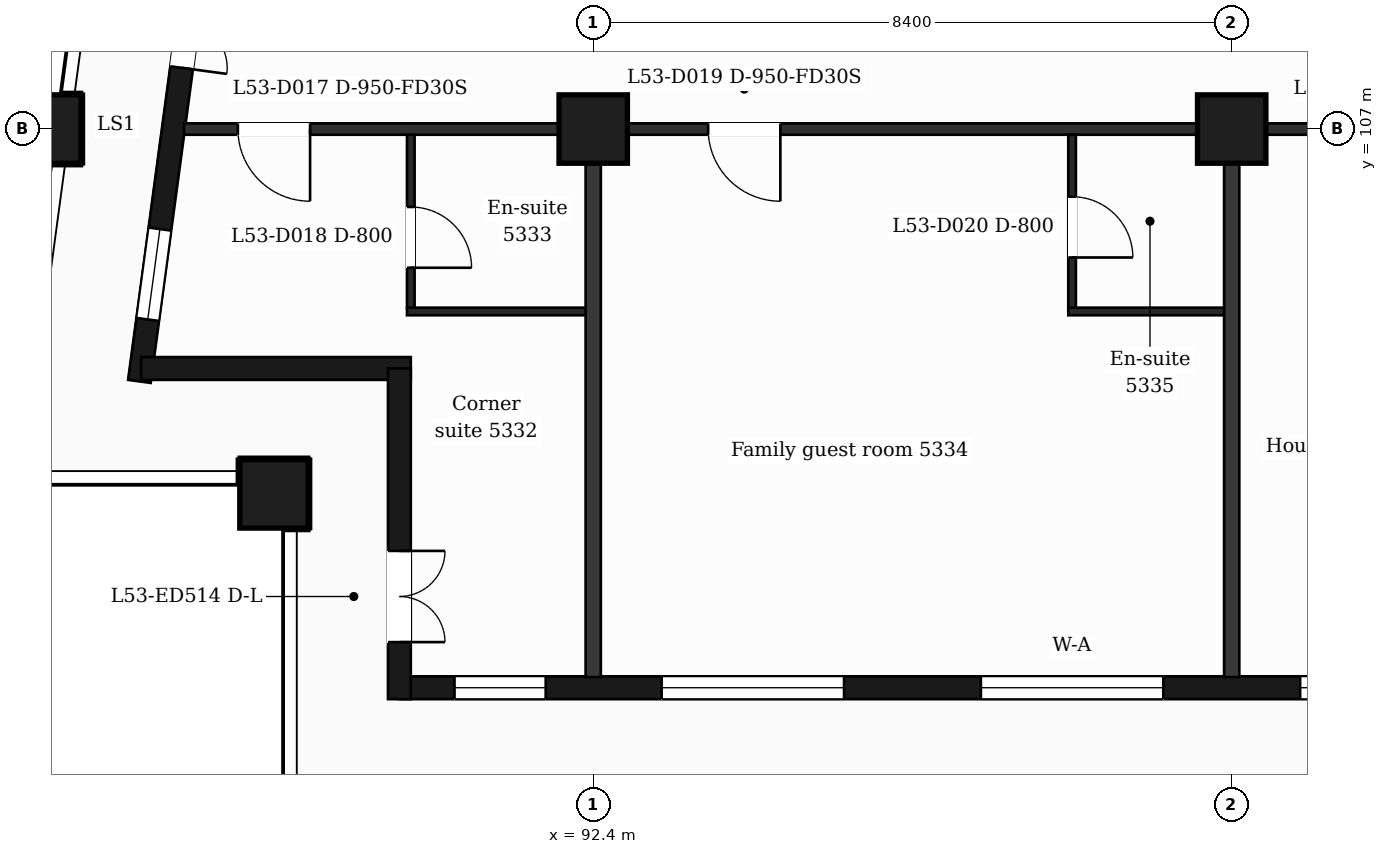
"""IFC4 building model, lengths in metres.
Left out: names, types, materials, properties, quantities, classifications, styles, units other than length and angle.
Written with IfcOpenShell. Run it as: python <this file> out.ifc"""

import sys

from ifc_helpers import new_model, si_unit, direction, frame, frame_2d, origin, origin_2d, place, context, subcontext, project, spatial, rectangle, extrude, element, fill, save


model = new_model("IFC4")
c1 = context("Model", 3, precision=1e-05, world=origin(), true_north=direction((0.0, 1.0)))
c2 = subcontext(c1, "Body", "Model", "MODEL_VIEW")
j1 = project(units=[si_unit("LENGTHUNIT", "METRE"), si_unit("PLANEANGLEUNIT", "RADIAN")], contexts=[c1])
p1 = place(None, origin())
s1 = spatial("IfcSite", under=j1, at=p1, CompositionType="ELEMENT")
p2 = place(p1, origin())
s2 = spatial("IfcBuilding", under=s1, at=p2, CompositionType="ELEMENT")
p3 = place(p2, frame((0.0, 0.0, 220.7)))
s3 = spatial("IfcBuildingStorey", under=s2, at=p3, CompositionType="ELEMENT", Elevation=220.7)
for number, where, z_axis, x_axis in (
    (1, (88.2, 102.2, 0.0), (0.0, 0.0, 1.0), (1.0, 0.0, 0.0)),
    (2, (92.4, 107.0, 0.0), (0.0, 0.0, 1.0), (1.0, 0.0, 0.0)),
    (3, (100.8, 107.0, 0.0), (0.0, 0.0, 1.0), (1.0, 0.0, 0.0)),
    (4, (85.211, 107.0, 0.0), (0.0, 0.0, 1.0), (1.0, 0.0, 0.0)),
):
    element("IfcColumn", number, at=place(p3, frame(where, z_axis=z_axis, x_axis=x_axis)), inside=s3, PredefinedType="COLUMN", context=c2, shape_type="SweptSolid", body=[
        extrude(rectangle(XDim=0.9, YDim=0.9, at=origin_2d()), origin(), (0.0, 0.0, 1.0), 3.7),
    ])
p4 = place(p3, frame((89.85, 99.65, 0.0), z_axis=(0.0, 0.0, 1.0), x_axis=(1.0, 0.0, 0.0)))
e5 = element("IfcWall", 5, at=p4, inside=s3, PredefinedType="SOLIDWALL", context=c2, shape_type="SweptSolid", body=[
    extrude(rectangle(XDim=47.25, YDim=0.3, at=frame_2d((23.625, 0.0))), origin(), (0.0, 0.0, 1.0), 3.38),
])
p5 = place(p4, frame((0.725, 0.0, 0.9)))
e6 = element("IfcOpeningElement", 6, at=p5, cuts=e5, PredefinedType="OPENING", context=c2, shape_type="SweptSolid", body=[
    extrude(rectangle(XDim=1.2, YDim=2.1, at=frame_2d((0.6, 1.05))), frame((0.0, 0.16, 0.0), z_axis=(0.0, -1.0, 0.0), x_axis=(1.0, 0.0, 0.0)), (0.0, 0.0, 1.0), 0.32),
])
p6 = place(p4, frame((3.45, 0.0, 0.9)))
e7 = element("IfcOpeningElement", 7, at=p6, cuts=e5, PredefinedType="OPENING", context=c2, shape_type="SweptSolid", body=[
    extrude(rectangle(XDim=2.4, YDim=2.1, at=frame_2d((1.2, 1.05))), frame((0.0, 0.16, 0.0), z_axis=(0.0, -1.0, 0.0), x_axis=(1.0, 0.0, 0.0)), (0.0, 0.0, 1.0), 0.32),
])
p7 = place(p4, frame((7.65, 0.0, 0.9)))
e8 = element("IfcOpeningElement", 8, at=p7, cuts=e5, PredefinedType="OPENING", context=c2, shape_type="SweptSolid", body=[
    extrude(rectangle(XDim=2.4, YDim=2.1, at=frame_2d((1.2, 1.05))), frame((0.0, 0.16, 0.0), z_axis=(0.0, -1.0, 0.0), x_axis=(1.0, 0.0, 0.0)), (0.0, 0.0, 1.0), 0.32),
])
p8 = place(p4, frame((11.85, 0.0, 0.9)))
e9 = element("IfcOpeningElement", 9, at=p8, cuts=e5, PredefinedType="OPENING", context=c2, shape_type="SweptSolid", body=[
    extrude(rectangle(XDim=2.4, YDim=2.1, at=frame_2d((1.2, 1.05))), frame((0.0, 0.16, 0.0), z_axis=(0.0, -1.0, 0.0), x_axis=(1.0, 0.0, 0.0)), (0.0, 0.0, 1.0), 0.32),
])
p9 = place(p4, frame((16.05, 0.0, 0.9)))
e10 = element("IfcOpeningElement", 10, at=p9, cuts=e5, PredefinedType="OPENING", context=c2, shape_type="SweptSolid", body=[
    extrude(rectangle(XDim=2.4, YDim=2.1, at=frame_2d((1.2, 1.05))), frame((0.0, 0.16, 0.0), z_axis=(0.0, -1.0, 0.0), x_axis=(1.0, 0.0, 0.0)), (0.0, 0.0, 1.0), 0.32),
])
p10 = place(p4, frame((20.25, 0.0, 0.9)))
e11 = element("IfcOpeningElement", 11, at=p10, cuts=e5, PredefinedType="OPENING", context=c2, shape_type="SweptSolid", body=[
    extrude(rectangle(XDim=2.4, YDim=2.1, at=frame_2d((1.2, 1.05))), frame((0.0, 0.16, 0.0), z_axis=(0.0, -1.0, 0.0), x_axis=(1.0, 0.0, 0.0)), (0.0, 0.0, 1.0), 0.32),
])
p11 = place(p4, frame((25.05, 0.0, 0.9)))
e12 = element("IfcOpeningElement", 12, at=p11, cuts=e5, PredefinedType="OPENING", context=c2, shape_type="SweptSolid", body=[
    extrude(rectangle(XDim=1.2, YDim=2.1, at=frame_2d((0.6, 1.05))), frame((0.0, 0.16, 0.0), z_axis=(0.0, -1.0, 0.0), x_axis=(1.0, 0.0, 0.0)), (0.0, 0.0, 1.0), 0.32),
])
p12 = place(p4, frame((29.25, 0.0, 0.9)))
e13 = element("IfcOpeningElement", 13, at=p12, cuts=e5, PredefinedType="OPENING", context=c2, shape_type="SweptSolid", body=[
    extrude(rectangle(XDim=1.2, YDim=2.1, at=frame_2d((0.6, 1.05))), frame((0.0, 0.16, 0.0), z_axis=(0.0, -1.0, 0.0), x_axis=(1.0, 0.0, 0.0)), (0.0, 0.0, 1.0), 0.32),
])
p13 = place(p4, frame((32.55, 0.0, 0.0)))
e14 = element("IfcOpeningElement", 14, at=p13, cuts=e5, PredefinedType="OPENING", context=c2, shape_type="SweptSolid", body=[
    extrude(rectangle(XDim=1.2, YDim=2.4, at=frame_2d((0.6, 1.2))), frame((0.0, 0.16, 0.0), z_axis=(0.0, -1.0, 0.0), x_axis=(1.0, 0.0, 0.0)), (0.0, 0.0, 1.0), 0.32),
])
p14 = place(p4, frame((34.35, 0.0, 0.9)))
e15 = element("IfcOpeningElement", 15, at=p14, cuts=e5, PredefinedType="OPENING", context=c2, shape_type="SweptSolid", body=[
    extrude(rectangle(XDim=1.2, YDim=2.1, at=frame_2d((0.6, 1.05))), frame((0.0, 0.16, 0.0), z_axis=(0.0, -1.0, 0.0), x_axis=(1.0, 0.0, 0.0)), (0.0, 0.0, 1.0), 0.32),
])
p15 = place(p4, frame((37.05, 0.0, 0.9)))
e16 = element("IfcOpeningElement", 16, at=p15, cuts=e5, PredefinedType="OPENING", context=c2, shape_type="SweptSolid", body=[
    extrude(rectangle(XDim=2.4, YDim=2.1, at=frame_2d((1.2, 1.05))), frame((0.0, 0.16, 0.0), z_axis=(0.0, -1.0, 0.0), x_axis=(1.0, 0.0, 0.0)), (0.0, 0.0, 1.0), 0.32),
])
p16 = place(p4, frame((40.95, 0.0, 0.0)))
e17 = element("IfcOpeningElement", 17, at=p16, cuts=e5, PredefinedType="OPENING", context=c2, shape_type="SweptSolid", body=[
    extrude(rectangle(XDim=1.2, YDim=2.4, at=frame_2d((0.6, 1.2))), frame((0.0, 0.16, 0.0), z_axis=(0.0, -1.0, 0.0), x_axis=(1.0, 0.0, 0.0)), (0.0, 0.0, 1.0), 0.32),
])
p17 = place(p4, frame((42.75, 0.0, 0.9)))
e18 = element("IfcOpeningElement", 18, at=p17, cuts=e5, PredefinedType="OPENING", context=c2, shape_type="SweptSolid", body=[
    extrude(rectangle(XDim=1.2, YDim=2.1, at=frame_2d((0.6, 1.05))), frame((0.0, 0.16, 0.0), z_axis=(0.0, -1.0, 0.0), x_axis=(1.0, 0.0, 0.0)), (0.0, 0.0, 1.0), 0.32),
])
p18 = place(p4, frame((45.25, 0.0, 0.9)))
e19 = element("IfcOpeningElement", 19, at=p18, cuts=e5, PredefinedType="OPENING", context=c2, shape_type="SweptSolid", body=[
    extrude(rectangle(XDim=1.2, YDim=2.1, at=frame_2d((0.6, 1.05))), frame((0.0, 0.16, 0.0), z_axis=(0.0, -1.0, 0.0), x_axis=(1.0, 0.0, 0.0)), (0.0, 0.0, 1.0), 0.32),
])
p19 = place(p3, frame((87.334, 110.4, 0.0), z_axis=(0.0, 0.0, 1.0), x_axis=(-0.133437175554, -0.991057273915, 0.0)))
e20 = element("IfcWall", 20, at=p19, inside=s3, PredefinedType="SOLIDWALL", context=c2, shape_type="SweptSolid", body=[
    extrude(rectangle(XDim=6.781, YDim=0.3, at=frame_2d((3.39, 0.0))), origin(), (0.0, 0.0, 1.0), 3.38),
])
p20 = place(p19, frame((1.418, 0.0, 0.0)))
e21 = element("IfcOpeningElement", 21, at=p20, cuts=e20, PredefinedType="OPENING", context=c2, shape_type="SweptSolid", body=[
    extrude(rectangle(XDim=1.2, YDim=2.4, at=frame_2d((0.6, 1.2))), frame((0.0, 0.16, 0.0), z_axis=(0.0, -1.0, 0.0), x_axis=(1.0, 0.0, 0.0)), (0.0, 0.0, 1.0), 0.32),
])
p21 = place(p19, frame((4.758, 0.0, 0.9)))
e22 = element("IfcOpeningElement", 22, at=p21, cuts=e20, PredefinedType="OPENING", context=c2, shape_type="SweptSolid", body=[
    extrude(rectangle(XDim=1.2, YDim=2.1, at=frame_2d((0.6, 1.05))), frame((0.0, 0.16, 0.0), z_axis=(0.0, -1.0, 0.0), x_axis=(1.0, 0.0, 0.0)), (0.0, 0.0, 1.0), 0.32),
])
p22 = place(p3, frame((86.452, 103.85, 0.0), z_axis=(0.0, 0.0, 1.0), x_axis=(1.0, 0.0, 0.0)))
e23 = element("IfcWall", 23, at=p22, inside=s3, PredefinedType="SOLIDWALL", context=c2, shape_type="SweptSolid", body=[
    extrude(rectangle(XDim=3.548, YDim=0.3, at=frame_2d((1.774, 0.0))), origin(), (0.0, 0.0, 1.0), 3.38),
])
p23 = place(p3, frame((89.85, 103.85, 0.0), z_axis=(0.0, 0.0, 1.0), x_axis=(0.0, -1.0, 0.0)))
e24 = element("IfcWall", 24, at=p23, inside=s3, PredefinedType="SOLIDWALL", context=c2, shape_type="SweptSolid", body=[
    extrude(rectangle(XDim=4.35, YDim=0.3, at=frame_2d((2.175, 0.0))), origin(), (0.0, 0.0, 1.0), 3.38),
])
p24 = place(p23, frame((2.4, 0.0, 0.0)))
e25 = element("IfcOpeningElement", 25, at=p24, cuts=e24, PredefinedType="OPENING", context=c2, shape_type="SweptSolid", body=[
    extrude(rectangle(XDim=1.2, YDim=2.4, at=frame_2d((0.6, 1.2))), frame((0.0, 0.16, 0.0), z_axis=(0.0, -1.0, 0.0), x_axis=(1.0, 0.0, 0.0)), (0.0, 0.0, 1.0), 0.32),
])
p25 = place(p3, frame((89.95, 104.6, 0.0), z_axis=(0.0, 0.0, 1.0), x_axis=(1.0, 0.0, 0.0)))
e26 = element("IfcWall", 26, at=p25, inside=s3, PredefinedType="PARTITIONING", context=c2, shape_type="SweptSolid", body=[
    extrude(rectangle(XDim=2.45, YDim=0.1, at=frame_2d((1.225, 0.0))), origin(), (0.0, 0.0, 1.0), 3.38),
])
p26 = place(p3, frame((98.65, 104.6, 0.0), z_axis=(0.0, 0.0, 1.0), x_axis=(1.0, 0.0, 0.0)))
e27 = element("IfcWall", 27, at=p26, inside=s3, PredefinedType="PARTITIONING", context=c2, shape_type="SweptSolid", body=[
    extrude(rectangle(XDim=2.15, YDim=0.1, at=frame_2d((1.075, 0.0))), origin(), (0.0, 0.0, 1.0), 3.38),
])
p27 = place(p3, frame((87.018, 107.0, 0.0), z_axis=(0.0, 0.0, 1.0), x_axis=(1.0, 0.0, 0.0)))
e28 = element("IfcWall", 28, at=p27, inside=s3, PredefinedType="PARTITIONING", context=c2, shape_type="SweptSolid", body=[
    extrude(rectangle(XDim=52.765, YDim=0.15, at=frame_2d((26.382, 0.0))), origin(), (0.0, 0.0, 1.0), 3.38),
])
p28 = place(p27, frame((0.707, 0.0, 0.0)))
e29 = element("IfcOpeningElement", 29, at=p28, cuts=e28, PredefinedType="OPENING", context=c2, shape_type="SweptSolid", body=[
    extrude(rectangle(XDim=0.95, YDim=2.1, at=frame_2d((0.475, 1.05))), frame((0.0, 0.085, 0.0), z_axis=(0.0, -1.0, 0.0), x_axis=(1.0, 0.0, 0.0)), (0.0, 0.0, 1.0), 0.17),
])
p29 = place(p27, frame((6.894, 0.0, 0.0)))
e30 = element("IfcOpeningElement", 30, at=p29, cuts=e28, PredefinedType="OPENING", context=c2, shape_type="SweptSolid", body=[
    extrude(rectangle(XDim=0.95, YDim=2.1, at=frame_2d((0.475, 1.05))), frame((0.0, 0.085, 0.0), z_axis=(0.0, -1.0, 0.0), x_axis=(1.0, 0.0, 0.0)), (0.0, 0.0, 1.0), 0.17),
])
p30 = place(p27, frame((15.662, 0.0, 0.0)))
e31 = element("IfcOpeningElement", 31, at=p30, cuts=e28, PredefinedType="OPENING", context=c2, shape_type="SweptSolid", body=[
    extrude(rectangle(XDim=0.95, YDim=2.1, at=frame_2d((0.475, 1.05))), frame((0.0, 0.085, 0.0), z_axis=(0.0, -1.0, 0.0), x_axis=(1.0, 0.0, 0.0)), (0.0, 0.0, 1.0), 0.17),
])
p31 = place(p27, frame((18.257, 0.0, 0.0)))
e32 = element("IfcOpeningElement", 32, at=p31, cuts=e28, PredefinedType="OPENING", context=c2, shape_type="SweptSolid", body=[
    extrude(rectangle(XDim=0.95, YDim=2.1, at=frame_2d((0.475, 1.05))), frame((0.0, 0.085, 0.0), z_axis=(0.0, -1.0, 0.0), x_axis=(1.0, 0.0, 0.0)), (0.0, 0.0, 1.0), 0.17),
])
p32 = place(p27, frame((28.607, 0.0, 0.0)))
e33 = element("IfcOpeningElement", 33, at=p32, cuts=e28, PredefinedType="OPENING", context=c2, shape_type="SweptSolid", body=[
    extrude(rectangle(XDim=1.0, YDim=2.1, at=frame_2d((0.5, 1.05))), frame((0.0, 0.085, 0.0), z_axis=(0.0, -1.0, 0.0), x_axis=(1.0, 0.0, 0.0)), (0.0, 0.0, 1.0), 0.17),
])
p33 = place(p27, frame((31.302, 0.0, 0.0)))
e34 = element("IfcOpeningElement", 34, at=p33, cuts=e28, PredefinedType="OPENING", context=c2, shape_type="SweptSolid", body=[
    extrude(rectangle(XDim=0.95, YDim=2.1, at=frame_2d((0.475, 1.05))), frame((0.0, 0.085, 0.0), z_axis=(0.0, -1.0, 0.0), x_axis=(1.0, 0.0, 0.0)), (0.0, 0.0, 1.0), 0.17),
])
p34 = place(p27, frame((35.057, 0.0, 0.0)))
e35 = element("IfcOpeningElement", 35, at=p34, cuts=e28, PredefinedType="OPENING", context=c2, shape_type="SweptSolid", body=[
    extrude(rectangle(XDim=0.95, YDim=2.1, at=frame_2d((0.475, 1.05))), frame((0.0, 0.085, 0.0), z_axis=(0.0, -1.0, 0.0), x_axis=(1.0, 0.0, 0.0)), (0.0, 0.0, 1.0), 0.17),
])
p35 = place(p27, frame((41.957, 0.0, 0.0)))
e36 = element("IfcOpeningElement", 36, at=p35, cuts=e28, PredefinedType="OPENING", context=c2, shape_type="SweptSolid", body=[
    extrude(rectangle(XDim=0.95, YDim=2.1, at=frame_2d((0.475, 1.05))), frame((0.0, 0.085, 0.0), z_axis=(0.0, -1.0, 0.0), x_axis=(1.0, 0.0, 0.0)), (0.0, 0.0, 1.0), 0.17),
])
p36 = place(p27, frame((45.712, 0.0, 0.0)))
e37 = element("IfcOpeningElement", 37, at=p36, cuts=e28, PredefinedType="OPENING", context=c2, shape_type="SweptSolid", body=[
    extrude(rectangle(XDim=1.0, YDim=2.1, at=frame_2d((0.5, 1.05))), frame((0.0, 0.085, 0.0), z_axis=(0.0, -1.0, 0.0), x_axis=(1.0, 0.0, 0.0)), (0.0, 0.0, 1.0), 0.17),
])
p37 = place(p27, frame((48.974, 0.0, 0.0)))
e38 = element("IfcOpeningElement", 38, at=p37, cuts=e28, PredefinedType="OPENING", context=c2, shape_type="SweptSolid", body=[
    extrude(rectangle(XDim=0.95, YDim=2.1, at=frame_2d((0.475, 1.05))), frame((0.0, 0.085, 0.0), z_axis=(0.0, -1.0, 0.0), x_axis=(1.0, 0.0, 0.0)), (0.0, 0.0, 1.0), 0.17),
])
p38 = place(p3, frame((90.0, 104.65, 0.0), z_axis=(0.0, 0.0, 1.0), x_axis=(0.0, 1.0, 0.0)))
e39 = element("IfcWall", 39, at=p38, inside=s3, PredefinedType="PARTITIONING", context=c2, shape_type="SweptSolid", body=[
    extrude(rectangle(XDim=2.275, YDim=0.1, at=frame_2d((1.138, 0.0))), origin(), (0.0, 0.0, 1.0), 3.38),
])
p39 = place(p38, frame((0.525, 0.0, 0.0)))
e40 = element("IfcOpeningElement", 40, at=p39, cuts=e39, PredefinedType="OPENING", context=c2, shape_type="SweptSolid", body=[
    extrude(rectangle(XDim=0.8, YDim=2.1, at=frame_2d((0.4, 1.05))), frame((0.0, 0.06, 0.0), z_axis=(0.0, -1.0, 0.0), x_axis=(1.0, 0.0, 0.0)), (0.0, 0.0, 1.0), 0.12),
])
p40 = place(p3, frame((92.4, 99.79, 0.0), z_axis=(0.0, 0.0, 1.0), x_axis=(0.0, 1.0, 0.0)))
e41 = element("IfcWall", 41, at=p40, inside=s3, PredefinedType="PARTITIONING", context=c2, shape_type="SweptSolid", body=[
    extrude(rectangle(XDim=7.135, YDim=0.2, at=frame_2d((3.567, 0.0))), origin(), (0.0, 0.0, 1.0), 3.38),
])
p41 = place(p3, frame((98.7, 104.65, 0.0), z_axis=(0.0, 0.0, 1.0), x_axis=(0.0, 1.0, 0.0)))
e42 = element("IfcWall", 42, at=p41, inside=s3, PredefinedType="PARTITIONING", context=c2, shape_type="SweptSolid", body=[
    extrude(rectangle(XDim=2.275, YDim=0.1, at=frame_2d((1.138, 0.0))), origin(), (0.0, 0.0, 1.0), 3.38),
])
p42 = place(p41, frame((0.66, 0.0, 0.0)))
e43 = element("IfcOpeningElement", 43, at=p42, cuts=e42, PredefinedType="OPENING", context=c2, shape_type="SweptSolid", body=[
    extrude(rectangle(XDim=0.8, YDim=2.1, at=frame_2d((0.4, 1.05))), frame((0.0, 0.06, 0.0), z_axis=(0.0, -1.0, 0.0), x_axis=(1.0, 0.0, 0.0)), (0.0, 0.0, 1.0), 0.12),
])
p43 = place(p3, frame((100.8, 99.79, 0.0), z_axis=(0.0, 0.0, 1.0), x_axis=(0.0, 1.0, 0.0)))
e44 = element("IfcWall", 44, at=p43, inside=s3, PredefinedType="PARTITIONING", context=c2, shape_type="SweptSolid", body=[
    extrude(rectangle(XDim=7.135, YDim=0.2, at=frame_2d((3.567, 0.0))), origin(), (0.0, 0.0, 1.0), 3.38),
])
p44 = place(p5, origin())
e45 = element("IfcWindow", 45, at=p44, inside=s3, PartitioningType="SINGLE_PANEL", PredefinedType="WINDOW", context=c2, shape_type="SweptSolid", body=[
    extrude(rectangle(XDim=1.2, YDim=2.1, at=frame_2d((0.6, 1.05))), frame((0.0, 0.03, 0.0), z_axis=(0.0, -1.0, 0.0), x_axis=(1.0, 0.0, 0.0)), (0.0, 0.0, 1.0), 0.06),
])
fill(e6, e45)
p45 = place(p6, origin())
e46 = element("IfcWindow", 46, at=p45, inside=s3, PartitioningType="SINGLE_PANEL", PredefinedType="WINDOW", context=c2, shape_type="SweptSolid", body=[
    extrude(rectangle(XDim=2.4, YDim=2.1, at=frame_2d((1.2, 1.05))), frame((0.0, 0.03, 0.0), z_axis=(0.0, -1.0, 0.0), x_axis=(1.0, 0.0, 0.0)), (0.0, 0.0, 1.0), 0.06),
])
fill(e7, e46)
p46 = place(p7, origin())
e47 = element("IfcWindow", 47, at=p46, inside=s3, PartitioningType="SINGLE_PANEL", PredefinedType="WINDOW", context=c2, shape_type="SweptSolid", body=[
    extrude(rectangle(XDim=2.4, YDim=2.1, at=frame_2d((1.2, 1.05))), frame((0.0, 0.03, 0.0), z_axis=(0.0, -1.0, 0.0), x_axis=(1.0, 0.0, 0.0)), (0.0, 0.0, 1.0), 0.06),
])
fill(e8, e47)
p47 = place(p8, origin())
e48 = element("IfcWindow", 48, at=p47, inside=s3, PartitioningType="SINGLE_PANEL", PredefinedType="WINDOW", context=c2, shape_type="SweptSolid", body=[
    extrude(rectangle(XDim=2.4, YDim=2.1, at=frame_2d((1.2, 1.05))), frame((0.0, 0.03, 0.0), z_axis=(0.0, -1.0, 0.0), x_axis=(1.0, 0.0, 0.0)), (0.0, 0.0, 1.0), 0.06),
])
fill(e9, e48)
p48 = place(p20, origin())
e49 = element("IfcDoor", 49, at=p48, inside=s3, OperationType="DOUBLE_DOOR_SINGLE_SWING", PredefinedType="DOOR", context=c2, shape_type="SweptSolid", body=[
    extrude(rectangle(XDim=1.2, YDim=2.4, at=frame_2d((0.6, 1.2))), frame((0.0, 0.025, 0.0), z_axis=(0.0, -1.0, 0.0), x_axis=(1.0, 0.0, 0.0)), (0.0, 0.0, 1.0), 0.05),
])
fill(e21, e49)
p49 = place(p21, origin())
e50 = element("IfcWindow", 50, at=p49, inside=s3, PartitioningType="SINGLE_PANEL", PredefinedType="WINDOW", context=c2, shape_type="SweptSolid", body=[
    extrude(rectangle(XDim=1.2, YDim=2.1, at=frame_2d((0.6, 1.05))), frame((0.0, 0.03, 0.0), z_axis=(0.0, -1.0, 0.0), x_axis=(1.0, 0.0, 0.0)), (0.0, 0.0, 1.0), 0.06),
])
fill(e22, e50)
p50 = place(p24, origin())
e51 = element("IfcDoor", 51, at=p50, inside=s3, OperationType="DOUBLE_DOOR_SINGLE_SWING", PredefinedType="DOOR", context=c2, shape_type="SweptSolid", body=[
    extrude(rectangle(XDim=1.2, YDim=2.4, at=frame_2d((0.6, 1.2))), frame((0.0, 0.025, 0.0), z_axis=(0.0, -1.0, 0.0), x_axis=(1.0, 0.0, 0.0)), (0.0, 0.0, 1.0), 0.05),
])
fill(e25, e51)
p51 = place(p28, origin())
e52 = element("IfcDoor", 52, at=p51, inside=s3, OperationType="SINGLE_SWING_RIGHT", PredefinedType="DOOR", context=c2, shape_type="SweptSolid", body=[
    extrude(rectangle(XDim=0.95, YDim=2.1, at=frame_2d((0.475, 1.05))), frame((0.0, 0.025, 0.0), z_axis=(0.0, -1.0, 0.0), x_axis=(1.0, 0.0, 0.0)), (0.0, 0.0, 1.0), 0.05),
])
fill(e29, e52)
p52 = place(p39, origin())
e53 = element("IfcDoor", 53, at=p52, inside=s3, OperationType="SINGLE_SWING_LEFT", PredefinedType="DOOR", context=c2, shape_type="SweptSolid", body=[
    extrude(rectangle(XDim=0.8, YDim=2.1, at=frame_2d((0.4, 1.05))), frame((0.0, 0.025, 0.0), z_axis=(0.0, -1.0, 0.0), x_axis=(1.0, 0.0, 0.0)), (0.0, 0.0, 1.0), 0.05),
])
fill(e40, e53)
p53 = place(p29, origin())
e54 = element("IfcDoor", 54, at=p53, inside=s3, OperationType="SINGLE_SWING_RIGHT", PredefinedType="DOOR", context=c2, shape_type="SweptSolid", body=[
    extrude(rectangle(XDim=0.95, YDim=2.1, at=frame_2d((0.475, 1.05))), frame((0.0, 0.025, 0.0), z_axis=(0.0, -1.0, 0.0), x_axis=(1.0, 0.0, 0.0)), (0.0, 0.0, 1.0), 0.05),
])
fill(e30, e54)
p54 = place(p42, origin())
e55 = element("IfcDoor", 55, at=p54, inside=s3, OperationType="SINGLE_SWING_LEFT", PredefinedType="DOOR", context=c2, shape_type="SweptSolid", body=[
    extrude(rectangle(XDim=0.8, YDim=2.1, at=frame_2d((0.4, 1.05))), frame((0.0, 0.025, 0.0), z_axis=(0.0, -1.0, 0.0), x_axis=(1.0, 0.0, 0.0)), (0.0, 0.0, 1.0), 0.05),
])
fill(e43, e55)
save(model, sys.argv[1])
